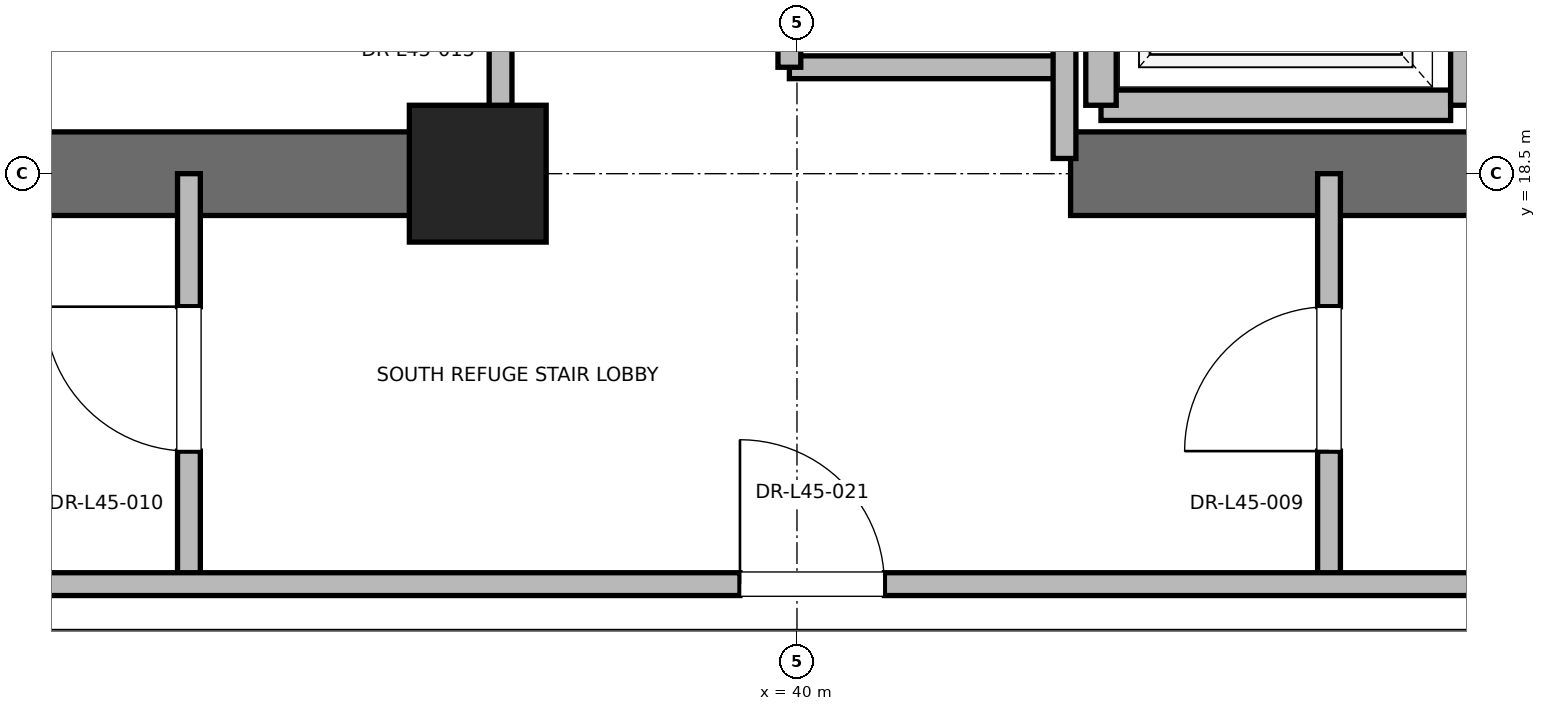
"""IFC4 building model, lengths in metres.
Left out: names, types, materials, properties, quantities, classifications, styles, units other than length and angle.
Written with IfcOpenShell. Run it as: python <this file> out.ifc"""

import sys

from ifc_helpers import new_model, si_unit, direction, frame, frame_2d, origin, origin_2d, place, context, subcontext, project, spatial, rectangle, extrude, element, fill, save


model = new_model("IFC4")
c1 = context("Model", 3, precision=1e-05, world=origin(), true_north=direction((0.0, 1.0)))
c2 = subcontext(c1, "Body", "Model", "MODEL_VIEW")
j1 = project(units=[si_unit("LENGTHUNIT", "METRE"), si_unit("PLANEANGLEUNIT", "RADIAN")], contexts=[c1])
p1 = place(None, origin())
s1 = spatial("IfcSite", under=j1, at=p1, CompositionType="ELEMENT")
p2 = place(p1, origin())
s2 = spatial("IfcBuilding", under=s1, at=p2, CompositionType="ELEMENT")
p3 = place(p2, frame((0.0, 0.0, 194.8)))
s3 = spatial("IfcBuildingStorey", under=s2, at=p3, CompositionType="ELEMENT", Elevation=194.8)
p4 = place(p3, frame((37.9, 18.5, 0.0), z_axis=(0.0, 0.0, 1.0), x_axis=(1.0, 0.0, 0.0)))
e1 = element("IfcColumn", 1, at=p4, inside=s3, PredefinedType="PILASTER", context=c2, shape_type="SweptSolid", body=[
    extrude(rectangle(XDim=0.9, YDim=0.9, at=origin_2d()), origin(), (0.0, 0.0, 1.0), 5.4),
])
for number, where, z_axis, x_axis in (
    (2, (29.0, 18.5, 0.0), (0.0, 0.0, 1.0), (1.0, 0.0, 0.0)),
    (3, (41.8, 18.5, 0.0), (0.0, 0.0, 1.0), (1.0, 0.0, 0.0)),
):
    element("IfcWall", number, at=place(p3, frame(where, z_axis=z_axis, x_axis=x_axis)), inside=s3, PredefinedType="SHEAR", context=c2, shape_type="SweptSolid", body=[
        extrude(rectangle(XDim=9.2, YDim=0.55, at=frame_2d((4.6, 0.0))), origin(), (0.0, 0.0, 1.0), 5.1),
    ])
p5 = place(p3, frame((42.0, 18.95, 0.0), z_axis=(0.0, 0.0, 1.0), x_axis=(1.0, 0.0, 0.0)))
e4 = element("IfcWall", 4, at=p5, inside=s3, PredefinedType="SOLIDWALL", context=c2, shape_type="SweptSolid", body=[
    extrude(rectangle(XDim=2.3, YDim=0.2, at=frame_2d((1.15, 0.0))), origin(), (0.0, 0.0, 1.0), 4.08),
])
p6 = place(p3, frame((42.0, 21.55, 0.0), z_axis=(0.0, 0.0, 1.0), x_axis=(0.0, -1.0, 0.0)))
e5 = element("IfcWall", 5, at=p6, inside=s3, PredefinedType="SOLIDWALL", context=c2, shape_type="SweptSolid", body=[
    extrude(rectangle(XDim=2.6, YDim=0.2, at=frame_2d((1.3, 0.0))), origin(), (0.0, 0.0, 1.0), 4.08),
])
p7 = place(p3, frame((44.4, 18.95, 0.0), z_axis=(0.0, 0.0, 1.0), x_axis=(0.0, 1.0, 0.0)))
e6 = element("IfcWall", 6, at=p7, inside=s3, PredefinedType="SOLIDWALL", context=c2, shape_type="SweptSolid", body=[
    extrude(rectangle(XDim=2.6, YDim=0.2, at=frame_2d((1.3, 0.0))), origin(), (0.0, 0.0, 1.0), 5.1),
])
p8 = place(p3, frame((39.95, 19.2, 0.0), z_axis=(0.0, 0.0, 1.0), x_axis=(1.0, 0.0, 0.0)))
e7 = element("IfcWall", 7, at=p8, inside=s3, PredefinedType="PARTITIONING", context=c2, shape_type="SweptSolid", body=[
    extrude(rectangle(XDim=1.81, YDim=0.15, at=frame_2d((0.905, 0.0))), origin(), (0.0, 0.0, 1.0), 2.85),
])
p9 = place(p3, frame((41.76, 18.6, 0.0), z_axis=(0.0, 0.0, 1.0), x_axis=(0.0, 1.0, 0.0)))
e8 = element("IfcWall", 8, at=p9, inside=s3, PredefinedType="PARTITIONING", context=c2, shape_type="SweptSolid", body=[
    extrude(rectangle(XDim=3.6, YDim=0.15, at=frame_2d((1.8, 0.0))), origin(), (0.0, 0.0, 1.0), 2.85),
])
p10 = place(p3, frame((39.95, 19.2, 0.0), z_axis=(0.0, 0.0, 1.0), x_axis=(0.0, 1.0, 0.0)))
e9 = element("IfcWall", 9, at=p10, inside=s3, PredefinedType="PARTITIONING", context=c2, shape_type="SweptSolid", body=[
    extrude(rectangle(XDim=3.0, YDim=0.15, at=frame_2d((1.5, 0.0))), origin(), (0.0, 0.0, 1.0), 2.85),
])
p11 = place(p10, frame((1.05, 0.0, 0.0)))
e10 = element("IfcOpeningElement", 10, at=p11, cuts=e9, PredefinedType="OPENING", context=c2, shape_type="SweptSolid", body=[
    extrude(rectangle(XDim=0.9, YDim=2.1, at=frame_2d((0.45, 1.05))), frame((0.0, 0.075, 0.0), z_axis=(0.0, -1.0, 0.0), x_axis=(1.0, 0.0, 0.0)), (0.0, 0.0, 1.0), 0.15),
])
p12 = place(p3, frame((38.05, 18.6, 0.0), z_axis=(0.0, 0.0, 1.0), x_axis=(0.0, 1.0, 0.0)))
e11 = element("IfcWall", 11, at=p12, inside=s3, PredefinedType="PARTITIONING", context=c2, shape_type="SweptSolid", body=[
    extrude(rectangle(XDim=3.06, YDim=0.15, at=frame_2d((1.53, 0.0))), origin(), (0.0, 0.0, 1.0), 2.85),
])
p13 = place(p12, frame((1.09, 0.0, 0.0)))
e12 = element("IfcOpeningElement", 12, at=p13, cuts=e11, PredefinedType="OPENING", context=c2, shape_type="SweptSolid", body=[
    extrude(rectangle(XDim=0.88, YDim=2.1, at=frame_2d((0.44, 1.05))), frame((0.0, 0.075, 0.0), z_axis=(0.0, -1.0, 0.0), x_axis=(1.0, 0.0, 0.0)), (0.0, 0.0, 1.0), 0.15),
])
p14 = place(p3, frame((36.0, 15.8, 0.0), z_axis=(0.0, 0.0, 1.0), x_axis=(0.0, 1.0, 0.0)))
e13 = element("IfcWall", 13, at=p14, inside=s3, PredefinedType="PARTITIONING", context=c2, shape_type="SweptSolid", body=[
    extrude(rectangle(XDim=2.7, YDim=0.15, at=frame_2d((1.35, 0.0))), origin(), (0.0, 0.0, 1.0), 2.85),
])
p15 = place(p14, frame((0.875, 0.0, 0.0)))
e14 = element("IfcOpeningElement", 14, at=p15, cuts=e13, PredefinedType="OPENING", context=c2, shape_type="SweptSolid", body=[
    extrude(rectangle(XDim=0.95, YDim=2.15, at=frame_2d((0.475, 1.075))), frame((0.0, 0.075, 0.0), z_axis=(0.0, -1.0, 0.0), x_axis=(1.0, 0.0, 0.0)), (0.0, 0.0, 1.0), 0.15),
])
p16 = place(p3, frame((43.5, 15.8, 0.0), z_axis=(0.0, 0.0, 1.0), x_axis=(0.0, 1.0, 0.0)))
e15 = element("IfcWall", 15, at=p16, inside=s3, PredefinedType="PARTITIONING", context=c2, shape_type="SweptSolid", body=[
    extrude(rectangle(XDim=2.7, YDim=0.15, at=frame_2d((1.35, 0.0))), origin(), (0.0, 0.0, 1.0), 2.85),
])
p17 = place(p16, frame((0.875, 0.0, 0.0)))
e16 = element("IfcOpeningElement", 16, at=p17, cuts=e15, PredefinedType="OPENING", context=c2, shape_type="SweptSolid", body=[
    extrude(rectangle(XDim=0.95, YDim=2.15, at=frame_2d((0.475, 1.075))), frame((0.0, 0.075, 0.0), z_axis=(0.0, -1.0, 0.0), x_axis=(1.0, 0.0, 0.0)), (0.0, 0.0, 1.0), 0.15),
])
p18 = place(p3, frame((29.25, 15.8, 0.0), z_axis=(0.0, 0.0, 1.0), x_axis=(1.0, 0.0, 0.0)))
e17 = element("IfcWall", 17, at=p18, inside=s3, PredefinedType="PARTITIONING", context=c2, shape_type="SweptSolid", body=[
    extrude(rectangle(XDim=21.5, YDim=0.15, at=frame_2d((10.75, 0.0))), origin(), (0.0, 0.0, 1.0), 2.85),
])
p19 = place(p18, frame((10.375, 0.0, 0.0)))
e18 = element("IfcOpeningElement", 18, at=p19, cuts=e17, PredefinedType="OPENING", context=c2, shape_type="SweptSolid", body=[
    extrude(rectangle(XDim=0.95, YDim=2.15, at=frame_2d((0.475, 1.075))), frame((0.0, 0.075, 0.0), z_axis=(0.0, -1.0, 0.0), x_axis=(1.0, 0.0, 0.0)), (0.0, 0.0, 1.0), 0.15),
])
p20 = place(p15, origin())
e19 = element("IfcDoor", 19, at=p20, inside=s3, OperationType="SINGLE_SWING_RIGHT", PredefinedType="DOOR", context=c2, shape_type="SweptSolid", body=[
    extrude(rectangle(XDim=0.95, YDim=2.15, at=frame_2d((0.475, 1.075))), frame((0.0, 0.025, 0.0), z_axis=(0.0, -1.0, 0.0), x_axis=(1.0, 0.0, 0.0)), (0.0, 0.0, 1.0), 0.05),
])
fill(e14, e19)
p21 = place(p17, origin())
e20 = element("IfcDoor", 20, at=p21, inside=s3, OperationType="SINGLE_SWING_LEFT", PredefinedType="DOOR", context=c2, shape_type="SweptSolid", body=[
    extrude(rectangle(XDim=0.95, YDim=2.15, at=frame_2d((0.475, 1.075))), frame((0.0, 0.025, 0.0), z_axis=(0.0, -1.0, 0.0), x_axis=(1.0, 0.0, 0.0)), (0.0, 0.0, 1.0), 0.05),
])
fill(e16, e20)
p22 = place(p19, origin())
e21 = element("IfcDoor", 21, at=p22, inside=s3, OperationType="SINGLE_SWING_LEFT", PredefinedType="DOOR", context=c2, shape_type="SweptSolid", body=[
    extrude(rectangle(XDim=0.95, YDim=2.15, at=frame_2d((0.475, 1.075))), frame((0.0, 0.025, 0.0), z_axis=(0.0, -1.0, 0.0), x_axis=(1.0, 0.0, 0.0)), (0.0, 0.0, 1.0), 0.05),
])
fill(e18, e21)
save(model, sys.argv[1])
